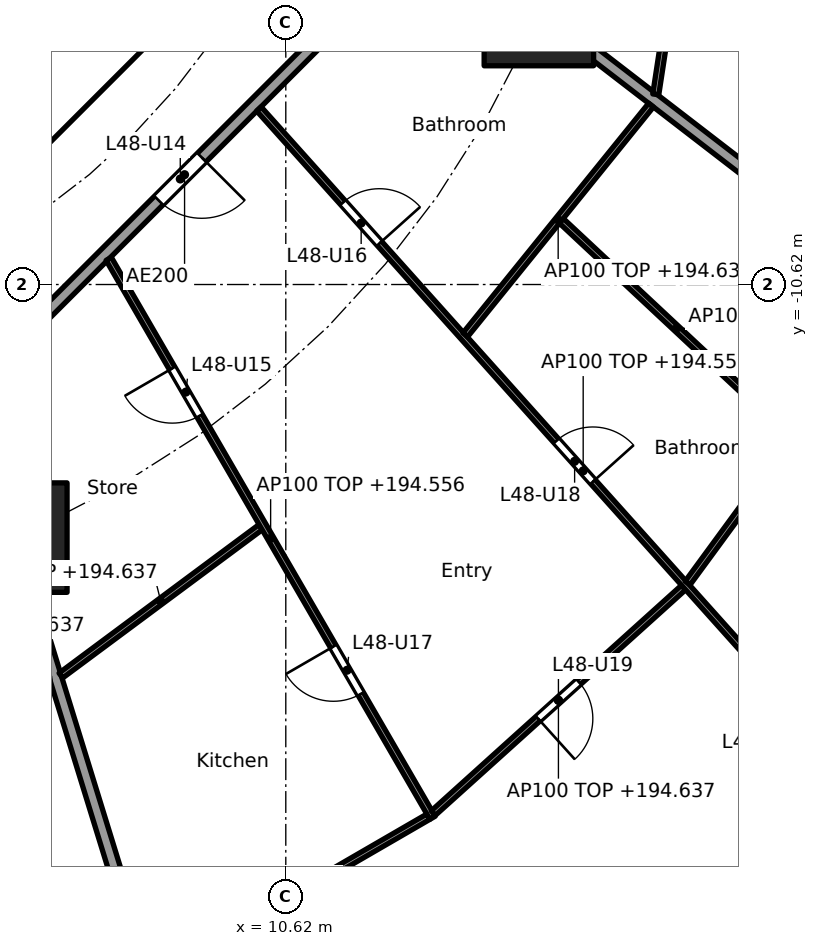
"""IFC4 building model, lengths in metres.
Left out: names, types, materials, properties, quantities, classifications, styles, units other than length and angle.
Written with IfcOpenShell. Run it as: python <this file> out.ifc"""

import sys

from ifc_helpers import new_model, si_unit, direction, frame, frame_2d, origin, origin_2d, place, context, subcontext, project, spatial, rectangle, extrude, element, fill, save


model = new_model("IFC4")
c1 = context("Model", 3, precision=1e-05, world=origin(), true_north=direction((0.0, 1.0)))
c2 = subcontext(c1, "Body", "Model", "MODEL_VIEW")
j1 = project(units=[si_unit("LENGTHUNIT", "METRE"), si_unit("PLANEANGLEUNIT", "RADIAN")], contexts=[c1])
p1 = place(None, origin())
s1 = spatial("IfcSite", under=j1, at=p1, CompositionType="ELEMENT")
p2 = place(p1, origin())
s2 = spatial("IfcBuilding", under=s1, at=p2, CompositionType="ELEMENT")
p3 = place(p2, frame((0.0, 0.0, 191.8)))
s3 = spatial("IfcBuildingStorey", under=s2, at=p3, CompositionType="ELEMENT", Elevation=191.8)
for number, where, z_axis, x_axis in (
    (1, (6.123, -14.782, 0.0), (0.0, 0.0, 1.0), (1.0, 0.0, 0.0)),
    (2, (14.782, -6.123, 0.0), (0.0, 0.0, 1.0), (1.0, 0.0, 0.0)),
):
    element("IfcColumn", number, at=place(p3, frame(where, z_axis=z_axis, x_axis=x_axis)), inside=s3, PredefinedType="COLUMN", context=c2, shape_type="SweptSolid", body=[
        extrude(rectangle(XDim=1.8, YDim=1.8, at=origin_2d()), origin(), (0.0, 0.0, 1.0), 3.7),
    ])
p4 = place(p3, frame((4.613, -9.988, 0.0), z_axis=(0.0, 0.0, 1.0), x_axis=(0.707106781187, 0.707106781187, 0.0)))
e3 = element("IfcWall", 3, at=p4, inside=s3, PredefinedType="SHEAR", context=c2, shape_type="SweptSolid", body=[
    extrude(rectangle(XDim=7.602, YDim=0.6, at=frame_2d((3.801, 0.0))), origin(), (0.0, 0.0, 1.0), 3.44),
])
p5 = place(p4, frame((3.201, 0.0, 0.0)))
e4 = element("IfcOpeningElement", 4, at=p5, cuts=e3, PredefinedType="OPENING", context=c2, shape_type="SweptSolid", body=[
    extrude(rectangle(XDim=1.2, YDim=2.1, at=frame_2d((0.6, 1.05))), frame((0.0, 0.31, 0.0), z_axis=(0.0, -1.0, 0.0), x_axis=(1.0, 0.0, 0.0)), (0.0, 0.0, 1.0), 0.62),
])
p6 = place(p3, frame((6.138, -14.83, 0.0), z_axis=(0.0, 0.0, 1.0), x_axis=(0.294818517221, -0.955553264818, 0.0)))
e5 = element("IfcWall", 5, at=p6, inside=s3, PredefinedType="PARTITIONING", context=c2, shape_type="SweptSolid", body=[
    extrude(rectangle(XDim=12.619, YDim=0.2, at=frame_2d((6.31, 0.0))), origin(), (0.0, 0.0, 1.0), 2.837),
])
p7 = place(p3, frame((14.822, -6.154, 0.0), z_axis=(0.0, 0.0, 1.0), x_axis=(0.792203056092, -0.610257583254, 0.0)))
e6 = element("IfcWall", 6, at=p7, inside=s3, PredefinedType="PARTITIONING", context=c2, shape_type="SweptSolid", body=[
    extrude(rectangle(XDim=12.533, YDim=0.2, at=frame_2d((6.266, 0.0))), origin(), (0.0, 0.0, 1.0), 2.837),
])
p8 = place(p3, frame((5.275, -12.494, 0.0), z_axis=(0.0, 0.0, 1.0), x_axis=(0.707106781187, 0.707106781187, 0.0)))
e7 = element("IfcWall", 7, at=p8, inside=s3, PredefinedType="PARTITIONING", context=c2, shape_type="SweptSolid", body=[
    extrude(rectangle(XDim=10.409, YDim=0.2, at=frame_2d((5.205, 0.0))), origin(), (0.0, 0.0, 1.0), 3.44),
])
p9 = place(p8, frame((4.604, 0.0, 0.0)))
e8 = element("IfcOpeningElement", 8, at=p9, cuts=e7, PredefinedType="OPENING", context=c2, shape_type="SweptSolid", body=[
    extrude(rectangle(XDim=1.0, YDim=2.1, at=frame_2d((0.5, 1.05))), frame((0.0, 0.11, 0.0), z_axis=(0.0, -1.0, 0.0), x_axis=(1.0, 0.0, 0.0)), (0.0, 0.0, 1.0), 0.22),
])
p10 = place(p3, frame((6.921, -17.05, 0.0), z_axis=(0.0, 0.0, 1.0), x_axis=(0.802769141821, 0.596289950394, 0.0)))
e9 = element("IfcWall", 9, at=p10, inside=s3, PredefinedType="PARTITIONING", context=c2, shape_type="SweptSolid", body=[
    extrude(rectangle(XDim=4.092, YDim=0.1, at=frame_2d((2.046, 0.0))), origin(), (0.0, 0.0, 1.0), 2.837),
])
p11 = place(p3, frame((8.448, -21.988, 0.0), z_axis=(0.0, 0.0, 1.0), x_axis=(0.865286427811, 0.501277765163, 0.0)))
e10 = element("IfcWall", 10, at=p11, inside=s3, PredefinedType="PARTITIONING", context=c2, shape_type="SweptSolid", body=[
    extrude(rectangle(XDim=5.22, YDim=0.1, at=frame_2d((2.61, 0.0))), origin(), (0.0, 0.0, 1.0), 2.837),
])
p12 = place(p3, frame((7.708, -10.198, 0.0), z_axis=(0.0, 0.0, 1.0), x_axis=(0.501288100085, -0.865280440501, 0.0)))
e11 = element("IfcWall", 11, at=p12, inside=s3, PredefinedType="PARTITIONING", context=c2, shape_type="SweptSolid", body=[
    extrude(rectangle(XDim=10.623, YDim=0.1, at=frame_2d((5.312, 0.0))), origin(), (0.0, 0.0, 1.0), 2.756),
])
p13 = place(p12, frame((2.082, 0.0, 0.0)))
e12 = element("IfcOpeningElement", 12, at=p13, cuts=e11, PredefinedType="OPENING", context=c2, shape_type="SweptSolid", body=[
    extrude(rectangle(XDim=0.9, YDim=2.1, at=frame_2d((0.45, 1.05))), frame((0.0, 0.06, 0.0), z_axis=(0.0, -1.0, 0.0), x_axis=(1.0, 0.0, 0.0)), (0.0, 0.0, 1.0), 0.12),
])
p14 = place(p12, frame((7.369, 0.0, 0.0)))
e13 = element("IfcOpeningElement", 13, at=p14, cuts=e11, PredefinedType="OPENING", context=c2, shape_type="SweptSolid", body=[
    extrude(rectangle(XDim=0.9, YDim=2.1, at=frame_2d((0.45, 1.05))), frame((0.0, 0.06, 0.0), z_axis=(0.0, -1.0, 0.0), x_axis=(1.0, 0.0, 0.0)), (0.0, 0.0, 1.0), 0.12),
])
p15 = place(p3, frame((13.045, -19.313, 0.0), z_axis=(0.0, 0.0, 1.0), x_axis=(0.742790086539, 0.66952437397, 0.0)))
e14 = element("IfcWall", 14, at=p15, inside=s3, PredefinedType="PARTITIONING", context=c2, shape_type="SweptSolid", body=[
    extrude(rectangle(XDim=5.542, YDim=0.1, at=frame_2d((2.771, 0.0))), origin(), (0.0, 0.0, 1.0), 2.837),
])
p16 = place(p15, frame((2.321, 0.0, 0.0)))
e15 = element("IfcOpeningElement", 15, at=p16, cuts=e14, PredefinedType="OPENING", context=c2, shape_type="SweptSolid", body=[
    extrude(rectangle(XDim=0.9, YDim=2.1, at=frame_2d((0.45, 1.05))), frame((0.0, 0.06, 0.0), z_axis=(0.0, -1.0, 0.0), x_axis=(1.0, 0.0, 0.0)), (0.0, 0.0, 1.0), 0.12),
])
p17 = place(p3, frame((10.178, -7.732, 0.0), z_axis=(0.0, 0.0, 1.0), x_axis=(0.667283629999, -0.74480370376, 0.0)))
e16 = element("IfcWall", 16, at=p17, inside=s3, PredefinedType="PARTITIONING", context=c2, shape_type="SweptSolid", body=[
    extrude(rectangle(XDim=15.983, YDim=0.1, at=frame_2d((7.992, 0.0))), origin(), (0.0, 0.0, 1.0), 2.756),
])
p18 = place(p17, frame((2.07, 0.0, 0.0)))
e17 = element("IfcOpeningElement", 17, at=p18, cuts=e16, PredefinedType="OPENING", context=c2, shape_type="SweptSolid", body=[
    extrude(rectangle(XDim=0.9, YDim=2.1, at=frame_2d((0.45, 1.05))), frame((0.0, 0.06, 0.0), z_axis=(0.0, -1.0, 0.0), x_axis=(1.0, 0.0, 0.0)), (0.0, 0.0, 1.0), 0.12),
])
p19 = place(p17, frame((7.331, 0.0, 0.0)))
e18 = element("IfcOpeningElement", 18, at=p19, cuts=e16, PredefinedType="OPENING", context=c2, shape_type="SweptSolid", body=[
    extrude(rectangle(XDim=0.9, YDim=2.1, at=frame_2d((0.45, 1.05))), frame((0.0, 0.06, 0.0), z_axis=(0.0, -1.0, 0.0), x_axis=(1.0, 0.0, 0.0)), (0.0, 0.0, 1.0), 0.12),
])
p20 = place(p17, frame((12.802, 0.0, 0.0)))
e19 = element("IfcOpeningElement", 19, at=p20, cuts=e16, PredefinedType="OPENING", context=c2, shape_type="SweptSolid", body=[
    extrude(rectangle(XDim=0.9, YDim=2.1, at=frame_2d((0.45, 1.05))), frame((0.0, 0.06, 0.0), z_axis=(0.0, -1.0, 0.0), x_axis=(1.0, 0.0, 0.0)), (0.0, 0.0, 1.0), 0.12),
])
p21 = place(p3, frame((13.572, -11.447, 0.0), z_axis=(0.0, 0.0, 1.0), x_axis=(0.628738316533, 0.777616955399, 0.0)))
e20 = element("IfcWall", 20, at=p21, inside=s3, PredefinedType="PARTITIONING", context=c2, shape_type="SweptSolid", body=[
    extrude(rectangle(XDim=4.857, YDim=0.1, at=frame_2d((2.429, 0.0))), origin(), (0.0, 0.0, 1.0), 2.837),
])
p22 = place(p3, frame((17.229, -15.529, 0.0), z_axis=(0.0, 0.0, 1.0), x_axis=(0.591110768293, 0.806590391468, 0.0)))
e21 = element("IfcWall", 21, at=p22, inside=s3, PredefinedType="PARTITIONING", context=c2, shape_type="SweptSolid", body=[
    extrude(rectangle(XDim=5.86, YDim=0.1, at=frame_2d((2.93, 0.0))), origin(), (0.0, 0.0, 1.0), 2.837),
])
p23 = place(p22, frame((3.958, 0.0, 0.0)))
e22 = element("IfcOpeningElement", 22, at=p23, cuts=e21, PredefinedType="OPENING", context=c2, shape_type="SweptSolid", body=[
    extrude(rectangle(XDim=0.9, YDim=2.1, at=frame_2d((0.45, 1.05))), frame((0.0, 0.06, 0.0), z_axis=(0.0, -1.0, 0.0), x_axis=(1.0, 0.0, 0.0)), (0.0, 0.0, 1.0), 0.12),
])
p24 = place(p3, frame((15.152, -9.573, 0.0), z_axis=(0.0, 0.0, 1.0), x_axis=(0.730723083214, -0.682673989294, 0.0)))
e23 = element("IfcWall", 23, at=p24, inside=s3, PredefinedType="PARTITIONING", context=c2, shape_type="SweptSolid", body=[
    extrude(rectangle(XDim=5.183, YDim=0.1, at=frame_2d((2.591, 0.0))), origin(), (0.0, 0.0, 1.0), 3.44),
])
p25 = place(p3, frame((16.704, -7.493, 0.0), z_axis=(0.0, 0.0, 1.0), x_axis=(0.1510806336, 0.988521442434, 0.0)))
e24 = element("IfcWall", 24, at=p25, inside=s3, PredefinedType="PARTITIONING", context=c2, shape_type="SweptSolid", body=[
    extrude(rectangle(XDim=3.419, YDim=0.1, at=frame_2d((1.71, 0.0))), origin(), (0.0, 0.0, 1.0), 2.837),
])
p26 = place(p25, frame((2.339, 0.0, 0.0)))
e25 = element("IfcOpeningElement", 25, at=p26, cuts=e24, PredefinedType="OPENING", context=c2, shape_type="SweptSolid", body=[
    extrude(rectangle(XDim=0.9, YDim=2.1, at=frame_2d((0.45, 1.05))), frame((0.0, 0.06, 0.0), z_axis=(0.0, -1.0, 0.0), x_axis=(1.0, 0.0, 0.0)), (0.0, 0.0, 1.0), 0.12),
])
p27 = place(p5, origin())
e26 = element("IfcDoor", 26, at=p27, inside=s3, OperationType="SINGLE_SWING_RIGHT", PredefinedType="DOOR", context=c2, shape_type="SweptSolid", body=[
    extrude(rectangle(XDim=1.2, YDim=2.1, at=frame_2d((0.6, 1.05))), frame((0.0, 0.025, 0.0), z_axis=(0.0, -1.0, 0.0), x_axis=(1.0, 0.0, 0.0)), (0.0, 0.0, 1.0), 0.05),
])
fill(e4, e26)
p28 = place(p9, frame((1.0, 0.0, 0.0), x_axis=(-1.0, 0.0, 0.0)))
e27 = element("IfcDoor", 27, at=p28, inside=s3, OperationType="SINGLE_SWING_LEFT", PredefinedType="DOOR", context=c2, shape_type="SweptSolid", body=[
    extrude(rectangle(XDim=1.0, YDim=2.1, at=frame_2d((0.5, 1.05))), frame((0.0, 0.025, 0.0), z_axis=(0.0, -1.0, 0.0), x_axis=(1.0, 0.0, 0.0)), (0.0, 0.0, 1.0), 0.05),
])
fill(e8, e27)
p29 = place(p13, frame((0.9, 0.0, 0.0), x_axis=(-1.0, 0.0, 0.0)))
e28 = element("IfcDoor", 28, at=p29, inside=s3, OperationType="SINGLE_SWING_RIGHT", PredefinedType="DOOR", context=c2, shape_type="SweptSolid", body=[
    extrude(rectangle(XDim=0.9, YDim=2.1, at=frame_2d((0.45, 1.05))), frame((0.0, 0.025, 0.0), z_axis=(0.0, -1.0, 0.0), x_axis=(1.0, 0.0, 0.0)), (0.0, 0.0, 1.0), 0.05),
])
fill(e12, e28)
p30 = place(p18, origin())
e29 = element("IfcDoor", 29, at=p30, inside=s3, OperationType="SINGLE_SWING_RIGHT", PredefinedType="DOOR", context=c2, shape_type="SweptSolid", body=[
    extrude(rectangle(XDim=0.9, YDim=2.1, at=frame_2d((0.45, 1.05))), frame((0.0, 0.025, 0.0), z_axis=(0.0, -1.0, 0.0), x_axis=(1.0, 0.0, 0.0)), (0.0, 0.0, 1.0), 0.05),
])
fill(e17, e29)
p31 = place(p14, frame((0.9, 0.0, 0.0), x_axis=(-1.0, 0.0, 0.0)))
e30 = element("IfcDoor", 30, at=p31, inside=s3, OperationType="SINGLE_SWING_RIGHT", PredefinedType="DOOR", context=c2, shape_type="SweptSolid", body=[
    extrude(rectangle(XDim=0.9, YDim=2.1, at=frame_2d((0.45, 1.05))), frame((0.0, 0.025, 0.0), z_axis=(0.0, -1.0, 0.0), x_axis=(1.0, 0.0, 0.0)), (0.0, 0.0, 1.0), 0.05),
])
fill(e13, e30)
p32 = place(p19, origin())
e31 = element("IfcDoor", 31, at=p32, inside=s3, OperationType="SINGLE_SWING_RIGHT", PredefinedType="DOOR", context=c2, shape_type="SweptSolid", body=[
    extrude(rectangle(XDim=0.9, YDim=2.1, at=frame_2d((0.45, 1.05))), frame((0.0, 0.025, 0.0), z_axis=(0.0, -1.0, 0.0), x_axis=(1.0, 0.0, 0.0)), (0.0, 0.0, 1.0), 0.05),
])
fill(e18, e31)
p33 = place(p16, frame((0.9, 0.0, 0.0), x_axis=(-1.0, 0.0, 0.0)))
e32 = element("IfcDoor", 32, at=p33, inside=s3, OperationType="SINGLE_SWING_RIGHT", PredefinedType="DOOR", context=c2, shape_type="SweptSolid", body=[
    extrude(rectangle(XDim=0.9, YDim=2.1, at=frame_2d((0.45, 1.05))), frame((0.0, 0.025, 0.0), z_axis=(0.0, -1.0, 0.0), x_axis=(1.0, 0.0, 0.0)), (0.0, 0.0, 1.0), 0.05),
])
fill(e15, e32)
save(model, sys.argv[1])
